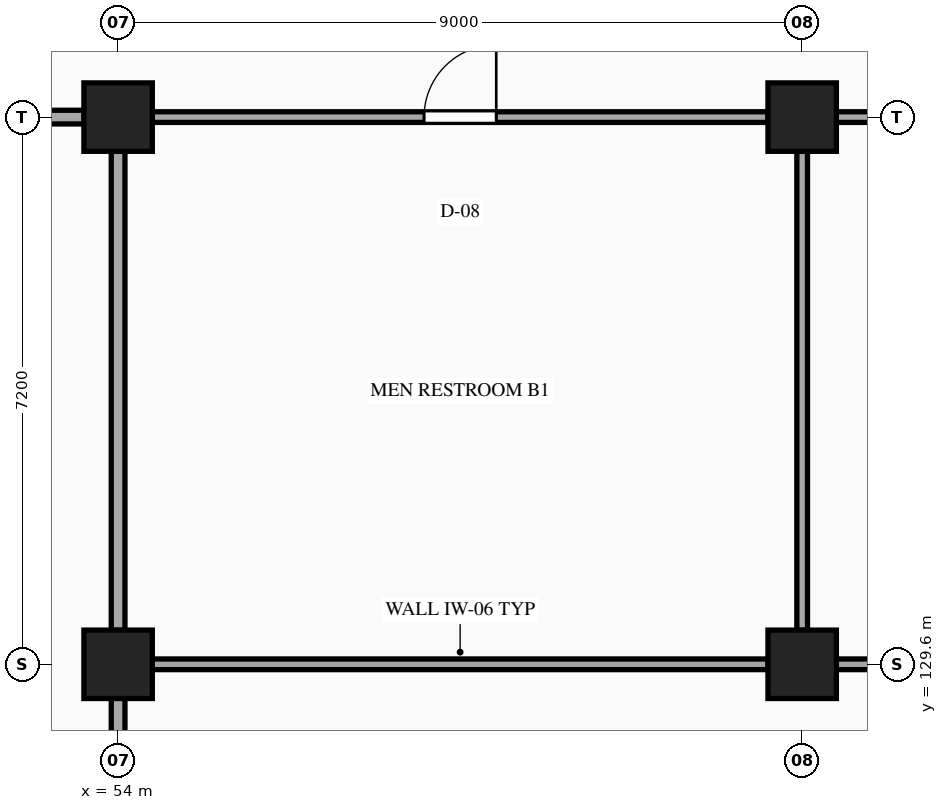
"""IFC4 building model, lengths in metres.
Left out: names, types, materials, properties, quantities, classifications, styles, units other than length and angle.
Written with IfcOpenShell. Run it as: python <this file> out.ifc"""

import sys

from ifc_helpers import new_model, si_unit, direction, frame, frame_2d, origin, origin_2d, place, context, subcontext, project, spatial, rectangle, extrude, element, fill, save


model = new_model("IFC4")
c1 = context("Model", 3, precision=1e-05, world=origin(), true_north=direction((0.0, 1.0)))
c2 = subcontext(c1, "Body", "Model", "MODEL_VIEW")
j1 = project(units=[si_unit("LENGTHUNIT", "METRE"), si_unit("PLANEANGLEUNIT", "RADIAN")], contexts=[c1])
p1 = place(None, origin())
s1 = spatial("IfcSite", under=j1, at=p1, CompositionType="ELEMENT")
p2 = place(p1, origin())
s2 = spatial("IfcBuilding", under=s1, at=p2, CompositionType="ELEMENT")
p3 = place(p2, frame((0.0, 0.0, -5.4)))
s3 = spatial("IfcBuildingStorey", under=s2, at=p3, CompositionType="ELEMENT", Elevation=-5.4)
for number, where, z_axis, x_axis in (
    (1, (54.0, 129.6, 0.0), (0.0, 0.0, 1.0), (1.0, 0.0, 0.0)),
    (2, (54.0, 136.8, 0.0), (0.0, 0.0, 1.0), (1.0, 0.0, 0.0)),
    (3, (63.0, 129.6, 0.0), (0.0, 0.0, 1.0), (1.0, 0.0, 0.0)),
    (4, (63.0, 136.8, 0.0), (0.0, 0.0, 1.0), (1.0, 0.0, 0.0)),
):
    element("IfcColumn", number, at=place(p3, frame(where, z_axis=z_axis, x_axis=x_axis)), inside=s3, PredefinedType="COLUMN", context=c2, shape_type="SweptSolid", body=[
        extrude(rectangle(XDim=0.9, YDim=0.9, at=origin_2d()), origin(), (0.0, 0.0, 1.0), 5.4),
    ])
for number, where, z_axis, x_axis in (
    (5, (54.448, 129.6, 0.0), (0.0, 0.0, 1.0), (1.0, 0.0, 0.0)),
    (6, (63.448, 129.6, 0.0), (0.0, 0.0, 1.0), (1.0, 0.0, 0.0)),
):
    element("IfcWall", number, at=place(p3, frame(where, z_axis=z_axis, x_axis=x_axis)), inside=s3, PredefinedType="PARTITIONING", context=c2, shape_type="SweptSolid", body=[
        extrude(rectangle(XDim=8.104, YDim=0.14, at=frame_2d((4.052, 0.0))), origin(), (0.0, 0.0, 1.0), 4.384),
    ])
p4 = place(p3, frame((45.448, 136.8, 0.0), z_axis=(0.0, 0.0, 1.0), x_axis=(1.0, 0.0, 0.0)))
e7 = element("IfcWall", 7, at=p4, inside=s3, PredefinedType="PARTITIONING", context=c2, shape_type="SweptSolid", body=[
    extrude(rectangle(XDim=8.104, YDim=0.18, at=frame_2d((4.052, 0.0))), origin(), (0.0, 0.0, 1.0), 4.384),
])
p5 = place(p4, frame((3.402, 0.0, 0.0)))
e8 = element("IfcOpeningElement", 8, at=p5, cuts=e7, PredefinedType="OPENING", context=c2, shape_type="SweptSolid", body=[
    extrude(rectangle(XDim=1.3, YDim=2.2, at=frame_2d((0.65, 1.1))), frame((0.0, 0.1, 0.0), z_axis=(0.0, -1.0, 0.0), x_axis=(1.0, 0.0, 0.0)), (0.0, 0.0, 1.0), 0.2),
])
p6 = place(p3, frame((54.448, 136.8, 0.0), z_axis=(0.0, 0.0, 1.0), x_axis=(1.0, 0.0, 0.0)))
e9 = element("IfcWall", 9, at=p6, inside=s3, PredefinedType="PARTITIONING", context=c2, shape_type="SweptSolid", body=[
    extrude(rectangle(XDim=8.104, YDim=0.14, at=frame_2d((4.052, 0.0))), origin(), (0.0, 0.0, 1.0), 4.384),
])
p7 = place(p6, frame((3.577, 0.0, 0.0)))
e10 = element("IfcOpeningElement", 10, at=p7, cuts=e9, PredefinedType="OPENING", context=c2, shape_type="SweptSolid", body=[
    extrude(rectangle(XDim=0.95, YDim=2.1, at=frame_2d((0.475, 1.05))), frame((0.0, 0.08, 0.0), z_axis=(0.0, -1.0, 0.0), x_axis=(1.0, 0.0, 0.0)), (0.0, 0.0, 1.0), 0.16),
])
p8 = place(p3, frame((63.448, 136.8, 0.0), z_axis=(0.0, 0.0, 1.0), x_axis=(1.0, 0.0, 0.0)))
e11 = element("IfcWall", 11, at=p8, inside=s3, PredefinedType="PARTITIONING", context=c2, shape_type="SweptSolid", body=[
    extrude(rectangle(XDim=8.104, YDim=0.14, at=frame_2d((4.052, 0.0))), origin(), (0.0, 0.0, 1.0), 4.384),
])
p9 = place(p8, frame((3.577, 0.0, 0.0)))
e12 = element("IfcOpeningElement", 12, at=p9, cuts=e11, PredefinedType="OPENING", context=c2, shape_type="SweptSolid", body=[
    extrude(rectangle(XDim=0.95, YDim=2.1, at=frame_2d((0.475, 1.05))), frame((0.0, 0.08, 0.0), z_axis=(0.0, -1.0, 0.0), x_axis=(1.0, 0.0, 0.0)), (0.0, 0.0, 1.0), 0.16),
])
p10 = place(p3, frame((54.0, 122.848, 0.0), z_axis=(0.0, 0.0, 1.0), x_axis=(0.0, 1.0, 0.0)))
e13 = element("IfcWall", 13, at=p10, inside=s3, PredefinedType="PARTITIONING", context=c2, shape_type="SweptSolid", body=[
    extrude(rectangle(XDim=6.304, YDim=0.18, at=frame_2d((3.152, 0.0))), origin(), (0.0, 0.0, 1.0), 4.397),
])
p11 = place(p3, frame((54.0, 130.048, 0.0), z_axis=(0.0, 0.0, 1.0), x_axis=(0.0, 1.0, 0.0)))
e14 = element("IfcWall", 14, at=p11, inside=s3, PredefinedType="PARTITIONING", context=c2, shape_type="SweptSolid", body=[
    extrude(rectangle(XDim=6.304, YDim=0.18, at=frame_2d((3.152, 0.0))), origin(), (0.0, 0.0, 1.0), 4.397),
])
p12 = place(p3, frame((63.0, 130.048, 0.0), z_axis=(0.0, 0.0, 1.0), x_axis=(0.0, 1.0, 0.0)))
e15 = element("IfcWall", 15, at=p12, inside=s3, PredefinedType="PARTITIONING", context=c2, shape_type="SweptSolid", body=[
    extrude(rectangle(XDim=6.304, YDim=0.14, at=frame_2d((3.152, 0.0))), origin(), (0.0, 0.0, 1.0), 4.397),
])
p13 = place(p7, origin())
e16 = element("IfcDoor", 16, at=p13, inside=s3, OperationType="SINGLE_SWING_RIGHT", PredefinedType="DOOR", context=c2, shape_type="SweptSolid", body=[
    extrude(rectangle(XDim=0.95, YDim=2.1, at=frame_2d((0.475, 1.05))), frame((0.0, 0.025, 0.0), z_axis=(0.0, -1.0, 0.0), x_axis=(1.0, 0.0, 0.0)), (0.0, 0.0, 1.0), 0.05),
])
fill(e10, e16)
save(model, sys.argv[1])
